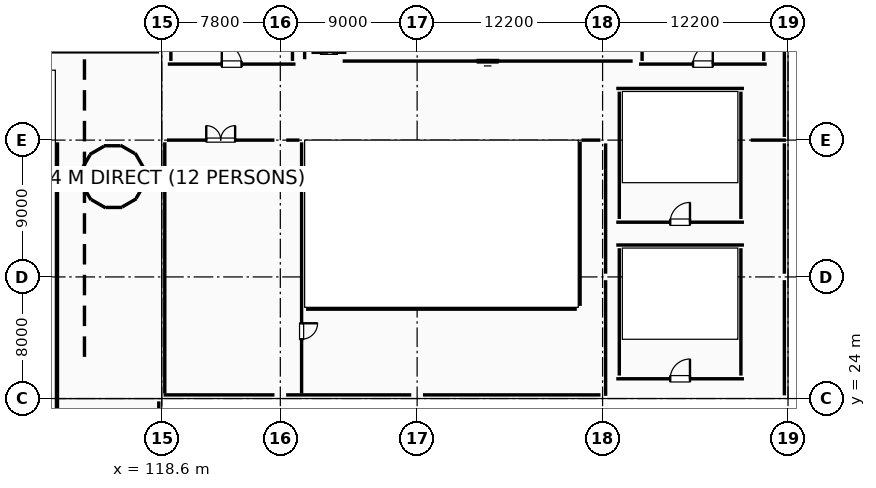
"""IFC4 building model, lengths in metres.
Left out: names, types, materials, properties, quantities, classifications, styles, units other than length and angle.
Written with IfcOpenShell. Run it as: python <this file> out.ifc"""

import sys

from ifc_helpers import new_model, si_unit, direction, frame, frame_2d, origin, origin_2d, place, context, subcontext, project, spatial, rectangle, i_section, extrude, element, fill, save


model = new_model("IFC4")
c1 = context("Model", 3, precision=1e-05, world=origin(), true_north=direction((0.0, 1.0)))
c2 = subcontext(c1, "Body", "Model", "MODEL_VIEW")
j1 = project(units=[si_unit("LENGTHUNIT", "METRE"), si_unit("PLANEANGLEUNIT", "RADIAN")], contexts=[c1])
p1 = place(None, origin())
s1 = spatial("IfcSite", under=j1, at=p1, CompositionType="ELEMENT")
p2 = place(p1, origin())
s2 = spatial("IfcBuilding", under=s1, at=p2, CompositionType="ELEMENT")
p3 = place(p2, frame((0.0, 0.0, 15.0)))
s3 = spatial("IfcBuildingStorey", under=s2, at=p3, CompositionType="ELEMENT", Elevation=15.0)
for number, where, z_axis, x_axis in (
    (1, (126.4, 24.0, 0.0), (0.0, 0.0, 1.0), (1.0, 0.0, 0.0)),
    (2, (126.4, 32.0, 0.0), (0.0, 0.0, 1.0), (1.0, 0.0, 0.0)),
):
    element("IfcColumn", number, at=place(p3, frame(where, z_axis=z_axis, x_axis=x_axis)), inside=s3, PredefinedType="COLUMN", context=c2, shape_type="SweptSolid", body=[
        extrude(rectangle(XDim=0.75, YDim=0.75, at=origin_2d()), origin(), (0.0, 0.0, 1.0), 4.76),
    ])
for number, where, z_axis, x_axis in (
    (3, (126.4, 41.0, 0.0), (0.0, 0.0, 1.0), (1.0, 0.0, 0.0)),
    (4, (135.4, 24.0, 0.0), (0.0, 0.0, 1.0), (1.0, 0.0, 0.0)),
    (5, (135.4, 41.0, 0.0), (0.0, 0.0, 1.0), (1.0, 0.0, 0.0)),
):
    element("IfcColumn", number, at=place(p3, frame(where, z_axis=z_axis, x_axis=x_axis)), inside=s3, PredefinedType="COLUMN", context=c2, shape_type="SweptSolid", body=[
        extrude(rectangle(XDim=0.75, YDim=0.75, at=origin_2d()), origin(), (0.0, 0.0, 1.0), 4.8),
    ])
for number, where, z_axis, x_axis in (
    (6, (147.6, 24.0, 0.0), (0.0, 0.0, 1.0), (1.0, 0.0, 0.0)),
    (7, (147.6, 32.0, 0.0), (0.0, 0.0, 1.0), (1.0, 0.0, 0.0)),
    (8, (147.6, 41.0, 0.0), (0.0, 0.0, 1.0), (1.0, 0.0, 0.0)),
):
    element("IfcColumn", number, at=place(p3, frame(where, z_axis=z_axis, x_axis=x_axis)), inside=s3, PredefinedType="COLUMN", context=c2, shape_type="SweptSolid", body=[
        extrude(i_section(OverallWidth=0.25, OverallDepth=0.4, WebThickness=0.01, FlangeThickness=0.013, FilletRadius=0.014, at=origin_2d()), origin(), (0.0, 0.0, 1.0), 4.8),
    ])
for number, where, z_axis, x_axis in (
    (9, (159.8, 24.0, 0.0), (0.0, 0.0, 1.0), (1.0, 0.0, 0.0)),
    (10, (159.8, 32.0, 0.0), (0.0, 0.0, 1.0), (1.0, 0.0, 0.0)),
    (11, (159.8, 41.0, 0.0), (0.0, 0.0, 1.0), (1.0, 0.0, 0.0)),
):
    element("IfcColumn", number, at=place(p3, frame(where, z_axis=z_axis, x_axis=x_axis)), inside=s3, PredefinedType="COLUMN", context=c2, shape_type="SweptSolid", body=[
        extrude(i_section(OverallWidth=0.25, OverallDepth=0.4, WebThickness=0.01, FlangeThickness=0.013, FilletRadius=0.014, at=origin_2d()), origin(), (0.0, 0.0, 1.0), 4.76),
    ])
p4 = place(p3, frame((112.6, 41.0, 0.0), z_axis=(0.0, 0.0, 1.0), x_axis=(1.0, 0.0, 0.0)))
e12 = element("IfcColumn", 12, at=p4, inside=s3, PredefinedType="COLUMN", context=c2, shape_type="SweptSolid", body=[
    extrude(rectangle(XDim=1.2, YDim=1.2, at=origin_2d()), origin(), (0.0, 0.0, 1.0), 4.8),
])
p5 = place(p3, frame((103.129, 46.805, 0.0), z_axis=(0.0, 0.0, 1.0), x_axis=(1.0, 0.0, 0.0)))
e13 = element("IfcWall", 13, at=p5, inside=s3, PredefinedType="STANDARD", context=c2, shape_type="SweptSolid", body=[
    extrude(rectangle(XDim=15.286, YDim=0.35, at=frame_2d((7.643, 0.0))), origin(), (0.0, 0.0, 1.0), 3.735),
])
for number, where, z_axis, x_axis in (
    (14, (159.56, 49.79, 0.0), (0.0, 0.0, 1.0), (0.0, -1.0, 0.0)),
    (15, (159.56, 40.79, 0.0), (0.0, 0.0, 1.0), (0.0, -1.0, 0.0)),
):
    element("IfcWall", number, at=place(p3, frame(where, z_axis=z_axis, x_axis=x_axis)), inside=s3, PredefinedType="PARAPET", context=c2, shape_type="SweptSolid", body=[
        extrude(rectangle(XDim=8.58, YDim=0.18, at=frame_2d((4.29, 0.0))), origin(), (0.0, 0.0, 1.0), 0.88),
    ])
p6 = place(p3, frame((159.56, 31.79, 0.0), z_axis=(0.0, 0.0, 1.0), x_axis=(0.0, -1.0, 0.0)))
e16 = element("IfcWall", 16, at=p6, inside=s3, PredefinedType="PARAPET", context=c2, shape_type="SweptSolid", body=[
    extrude(rectangle(XDim=7.58, YDim=0.18, at=frame_2d((3.79, 0.0))), origin(), (0.0, 0.0, 1.0), 0.88),
])
p7 = place(p3, frame((147.465, 24.24, 0.0), z_axis=(0.0, 0.0, 1.0), x_axis=(-1.0, 0.0, 0.0)))
e17 = element("IfcWall", 17, at=p7, inside=s3, PredefinedType="PARAPET", context=c2, shape_type="SweptSolid", body=[
    extrude(rectangle(XDim=11.68, YDim=0.18, at=frame_2d((5.84, 0.0))), origin(), (0.0, 0.0, 1.0), 0.88),
])
p8 = place(p3, frame((135.015, 24.24, 0.0), z_axis=(0.0, 0.0, 1.0), x_axis=(-1.0, 0.0, 0.0)))
e18 = element("IfcWall", 18, at=p8, inside=s3, PredefinedType="PARAPET", context=c2, shape_type="SweptSolid", body=[
    extrude(rectangle(XDim=8.23, YDim=0.18, at=frame_2d((4.115, 0.0))), origin(), (0.0, 0.0, 1.0), 0.88),
])
p9 = place(p3, frame((126.015, 24.24, 0.0), z_axis=(0.0, 0.0, 1.0), x_axis=(-1.0, 0.0, 0.0)))
e19 = element("IfcWall", 19, at=p9, inside=s3, PredefinedType="PARAPET", context=c2, shape_type="SweptSolid", body=[
    extrude(rectangle(XDim=7.295, YDim=0.18, at=frame_2d((3.647, 0.0))), origin(), (0.0, 0.0, 1.0), 0.88),
])
p10 = place(p3, frame((118.405, 23.815, 0.0), z_axis=(0.0, 0.0, 1.0), x_axis=(0.0, -1.0, 0.0)))
e20 = element("IfcWall", 20, at=p10, inside=s3, PredefinedType="STANDARD", context=c2, shape_type="SweptSolid", body=[
    extrude(rectangle(XDim=13.63, YDim=0.35, at=frame_2d((6.815, 0.0))), origin(), (0.0, 0.0, 1.0), 3.735),
])
p11 = place(p3, frame((119.0, 46.0, 0.0), z_axis=(0.0, 0.0, 1.0), x_axis=(1.0, 0.0, 0.0)))
e21 = element("IfcWall", 21, at=p11, inside=s3, PredefinedType="SHEAR", context=c2, shape_type="SweptSolid", body=[
    extrude(rectangle(XDim=8.4, YDim=0.4, at=frame_2d((4.2, 0.0))), origin(), (0.0, 0.0, 1.0), 4.55),
])
p12 = place(p11, frame((3.55, 0.0, 0.0)))
e22 = element("IfcOpeningElement", 22, at=p12, cuts=e21, PredefinedType="OPENING", context=c2, shape_type="SweptSolid", body=[
    extrude(rectangle(XDim=1.3, YDim=2.15, at=frame_2d((0.65, 1.075))), frame((0.0, 0.21, 0.0), z_axis=(0.0, -1.0, 0.0), x_axis=(1.0, 0.0, 0.0)), (0.0, 0.0, 1.0), 0.42),
])
for number, where, z_axis, x_axis in (
    (23, (127.2, 46.21, 0.0), (0.0, 0.0, 1.0), (0.0, 1.0, 0.0)),
    (24, (119.2, 54.59, 0.0), (0.0, 0.0, 1.0), (0.0, -1.0, 0.0)),
):
    element("IfcWall", number, at=place(p3, frame(where, z_axis=z_axis, x_axis=x_axis)), inside=s3, PredefinedType="SHEAR", context=c2, shape_type="SweptSolid", body=[
        extrude(rectangle(XDim=8.38, YDim=0.4, at=frame_2d((4.19, 0.0))), origin(), (0.0, 0.0, 1.0), 4.55),
    ])
p13 = place(p3, frame((128.45, 46.775, 0.0), z_axis=(0.0, 0.0, 1.0), x_axis=(1.0, 0.0, 0.0)))
e25 = element("IfcWall", 25, at=p13, inside=s3, PredefinedType="STANDARD", context=c2, shape_type="SweptSolid", body=[
    extrude(rectangle(XDim=2.3, YDim=0.25, at=frame_2d((1.15, 0.0))), origin(), (0.0, 0.0, 1.0), 4.53),
])
p14 = place(p13, frame((0.6, 0.0, 0.0)))
e26 = element("IfcOpeningElement", 26, at=p14, cuts=e25, PredefinedType="OPENING", context=c2, shape_type="SweptSolid", body=[
    extrude(rectangle(XDim=1.1, YDim=2.15, at=frame_2d((0.55, 1.075))), frame((0.0, 0.135, 0.0), z_axis=(0.0, -1.0, 0.0), x_axis=(1.0, 0.0, 0.0)), (0.0, 0.0, 1.0), 0.27),
])
p15 = place(p3, frame((150.0, 46.0, 0.0), z_axis=(0.0, 0.0, 1.0), x_axis=(1.0, 0.0, 0.0)))
e27 = element("IfcWall", 27, at=p15, inside=s3, PredefinedType="SHEAR", context=c2, shape_type="SweptSolid", body=[
    extrude(rectangle(XDim=8.4, YDim=0.4, at=frame_2d((4.2, 0.0))), origin(), (0.0, 0.0, 1.0), 4.58),
])
p16 = place(p15, frame((3.55, 0.0, 0.0)))
e28 = element("IfcOpeningElement", 28, at=p16, cuts=e27, PredefinedType="OPENING", context=c2, shape_type="SweptSolid", body=[
    extrude(rectangle(XDim=1.3, YDim=2.15, at=frame_2d((0.65, 1.075))), frame((0.0, 0.21, 0.0), z_axis=(0.0, -1.0, 0.0), x_axis=(1.0, 0.0, 0.0)), (0.0, 0.0, 1.0), 0.42),
])
for number, where, z_axis, x_axis in (
    (29, (158.2, 46.21, 0.0), (0.0, 0.0, 1.0), (0.0, 1.0, 0.0)),
    (30, (150.2, 54.59, 0.0), (0.0, 0.0, 1.0), (0.0, -1.0, 0.0)),
):
    element("IfcWall", number, at=place(p3, frame(where, z_axis=z_axis, x_axis=x_axis)), inside=s3, PredefinedType="SHEAR", context=c2, shape_type="SweptSolid", body=[
        extrude(rectangle(XDim=8.38, YDim=0.4, at=frame_2d((4.19, 0.0))), origin(), (0.0, 0.0, 1.0), 4.58),
    ])
p17 = place(p3, frame((148.5, 25.3, 0.0), z_axis=(0.0, 0.0, 1.0), x_axis=(1.0, 0.0, 0.0)))
e31 = element("IfcWall", 31, at=p17, inside=s3, PredefinedType="SHEAR", context=c2, shape_type="SweptSolid", body=[
    extrude(rectangle(XDim=8.4, YDim=0.4, at=frame_2d((4.2, 0.0))), origin(), (0.0, 0.0, 1.0), 4.58),
])
p18 = place(p17, frame((3.55, 0.0, 0.0)))
e32 = element("IfcOpeningElement", 32, at=p18, cuts=e31, PredefinedType="OPENING", context=c2, shape_type="SweptSolid", body=[
    extrude(rectangle(XDim=1.3, YDim=2.15, at=frame_2d((0.65, 1.075))), frame((0.0, 0.21, 0.0), z_axis=(0.0, -1.0, 0.0), x_axis=(1.0, 0.0, 0.0)), (0.0, 0.0, 1.0), 0.42),
])
p19 = place(p3, frame((156.9, 34.1, 0.0), z_axis=(0.0, 0.0, 1.0), x_axis=(-1.0, 0.0, 0.0)))
e33 = element("IfcWall", 33, at=p19, inside=s3, PredefinedType="SHEAR", context=c2, shape_type="SweptSolid", body=[
    extrude(rectangle(XDim=8.4, YDim=0.4, at=frame_2d((4.2, 0.0))), origin(), (0.0, 0.0, 1.0), 4.58),
])
for number, where, z_axis, x_axis in (
    (34, (156.7, 25.51, 0.0), (0.0, 0.0, 1.0), (0.0, 1.0, 0.0)),
    (35, (148.7, 33.89, 0.0), (0.0, 0.0, 1.0), (0.0, -1.0, 0.0)),
):
    element("IfcWall", number, at=place(p3, frame(where, z_axis=z_axis, x_axis=x_axis)), inside=s3, PredefinedType="SHEAR", context=c2, shape_type="SweptSolid", body=[
        extrude(rectangle(XDim=8.38, YDim=0.4, at=frame_2d((4.19, 0.0))), origin(), (0.0, 0.0, 1.0), 4.58),
    ])
p20 = place(p3, frame((148.5, 35.6, 0.0), z_axis=(0.0, 0.0, 1.0), x_axis=(1.0, 0.0, 0.0)))
e36 = element("IfcWall", 36, at=p20, inside=s3, PredefinedType="SHEAR", context=c2, shape_type="SweptSolid", body=[
    extrude(rectangle(XDim=8.4, YDim=0.4, at=frame_2d((4.2, 0.0))), origin(), (0.0, 0.0, 1.0), 4.58),
])
p21 = place(p20, frame((3.55, 0.0, 0.0)))
e37 = element("IfcOpeningElement", 37, at=p21, cuts=e36, PredefinedType="OPENING", context=c2, shape_type="SweptSolid", body=[
    extrude(rectangle(XDim=1.3, YDim=2.15, at=frame_2d((0.65, 1.075))), frame((0.0, 0.21, 0.0), z_axis=(0.0, -1.0, 0.0), x_axis=(1.0, 0.0, 0.0)), (0.0, 0.0, 1.0), 0.42),
])
p22 = place(p3, frame((156.9, 44.4, 0.0), z_axis=(0.0, 0.0, 1.0), x_axis=(-1.0, 0.0, 0.0)))
e38 = element("IfcWall", 38, at=p22, inside=s3, PredefinedType="SHEAR", context=c2, shape_type="SweptSolid", body=[
    extrude(rectangle(XDim=8.4, YDim=0.4, at=frame_2d((4.2, 0.0))), origin(), (0.0, 0.0, 1.0), 4.58),
])
for number, where, z_axis, x_axis in (
    (39, (156.7, 35.81, 0.0), (0.0, 0.0, 1.0), (0.0, 1.0, 0.0)),
    (40, (148.7, 44.19, 0.0), (0.0, 0.0, 1.0), (0.0, -1.0, 0.0)),
):
    element("IfcWall", number, at=place(p3, frame(where, z_axis=z_axis, x_axis=x_axis)), inside=s3, PredefinedType="SHEAR", context=c2, shape_type="SweptSolid", body=[
        extrude(rectangle(XDim=8.38, YDim=0.4, at=frame_2d((4.19, 0.0))), origin(), (0.0, 0.0, 1.0), 4.58),
    ])
p23 = place(p3, frame((117.461, 39.086, 0.0), z_axis=(0.0, 0.0, 1.0), x_axis=(-0.500080723117, 0.865978793255, 0.0)))
e41 = element("IfcWall", 41, at=p23, inside=s3, PredefinedType="SHEAR", context=c2, shape_type="SweptSolid", body=[
    extrude(rectangle(XDim=1.219, YDim=0.35, at=frame_2d((0.609, 0.0))), origin(), (0.0, 0.0, 1.0), 4.55),
])
for number, where, z_axis, x_axis in (
    (42, (116.833, 40.115, 0.0), (0.0, 0.0, 1.0), (-0.866, 0.5, 0.0)),
    (43, (115.884, 40.628, 0.0), (0.0, 0.0, 1.0), (-1.0, 0.0, 0.0)),
    (44, (114.804, 40.598, 0.0), (0.0, 0.0, 1.0), (-0.866, -0.5, 0.0)),
    (45, (113.885, 40.033, 0.0), (0.0, 0.0, 1.0), (-0.5, -0.866, 0.0)),
    (46, (113.372, 39.083, 0.0), (0.0, 0.0, 1.0), (0.0, -1.0, 0.0)),
    (47, (113.402, 38.004, 0.0), (0.0, 0.0, 1.0), (0.5, -0.866, 0.0)),
    (48, (113.967, 37.085, 0.0), (0.0, 0.0, 1.0), (0.866, -0.5, 0.0)),
    (49, (114.917, 36.572, 0.0), (0.0, 0.0, 1.0), (1.0, 0.0, 0.0)),
    (50, (115.996, 36.602, 0.0), (0.0, 0.0, 1.0), (0.866, 0.5, 0.0)),
    (51, (116.915, 37.167, 0.0), (0.0, 0.0, 1.0), (0.5, 0.866, 0.0)),
):
    element("IfcWall", number, at=place(p3, frame(where, z_axis=z_axis, x_axis=x_axis)), inside=s3, PredefinedType="SHEAR", context=c2, shape_type="SweptSolid", body=[
        extrude(rectangle(XDim=1.093, YDim=0.35, at=frame_2d((0.546, 0.0))), origin(), (0.0, 0.0, 1.0), 4.55),
    ])
p24 = place(p3, frame((117.428, 38.116, 0.0), z_axis=(0.0, 0.0, 1.0), x_axis=(0.0, 1.0, 0.0)))
e52 = element("IfcWall", 52, at=p24, inside=s3, PredefinedType="SHEAR", context=c2, shape_type="SweptSolid", body=[
    extrude(rectangle(XDim=0.967, YDim=0.35, at=frame_2d((0.483, 0.0))), origin(), (0.0, 0.0, 1.0), 4.55),
])
p25 = place(p3, frame((111.74, 21.345, 0.0), z_axis=(0.0, 0.0, 1.0), x_axis=(0.0, 1.0, 0.0)))
e53 = element("IfcWall", 53, at=p25, inside=s3, PredefinedType="PARTITIONING", context=c2, shape_type="SweptSolid", body=[
    extrude(rectangle(XDim=19.51, YDim=0.25, at=frame_2d((9.755, 0.0))), origin(), (0.0, 0.0, 1.0), 4.54),
])
p26 = place(p3, frame((149.58, 46.2, 0.0), z_axis=(0.0, 0.0, 1.0), x_axis=(-1.0, 0.0, 0.0)))
e54 = element("IfcWall", 54, at=p26, inside=s3, PredefinedType="PARTITIONING", context=c2, shape_type="SweptSolid", body=[
    extrude(rectangle(XDim=19.08, YDim=0.2, at=frame_2d((9.54, 0.0))), origin(), (0.0, 0.0, 1.0), 4.53),
])
p27 = place(p26, frame((8.84, 0.0, 0.0)))
e55 = element("IfcOpeningElement", 55, at=p27, cuts=e54, PredefinedType="OPENING", context=c2, shape_type="SweptSolid", body=[
    extrude(rectangle(XDim=1.4, YDim=2.15, at=frame_2d((0.7, 1.075))), frame((0.0, 0.11, 0.0), z_axis=(0.0, -1.0, 0.0), x_axis=(1.0, 0.0, 0.0)), (0.0, 0.0, 1.0), 0.22),
])
p28 = place(p3, frame((128.0, 46.32, 0.0), z_axis=(0.0, 0.0, 1.0), x_axis=(0.0, 1.0, 0.0)))
e56 = element("IfcWall", 56, at=p28, inside=s3, PredefinedType="PARTITIONING", context=c2, shape_type="SweptSolid", body=[
    extrude(rectangle(XDim=9.376, YDim=0.2, at=frame_2d((4.688, 0.0))), origin(), (0.0, 0.0, 1.0), 4.54),
])
p29 = place(p3, frame((147.8, 24.18, 0.0), z_axis=(0.0, 0.0, 1.0), x_axis=(0.0, 1.0, 0.0)))
e57 = element("IfcWall", 57, at=p29, inside=s3, PredefinedType="PARTITIONING", context=c2, shape_type="SweptSolid", body=[
    extrude(rectangle(XDim=7.605, YDim=0.25, at=frame_2d((3.802, 0.0))), origin(), (0.0, 0.0, 1.0), 4.57),
])
p30 = place(p3, frame((147.8, 32.215, 0.0), z_axis=(0.0, 0.0, 1.0), x_axis=(0.0, 1.0, 0.0)))
e58 = element("IfcWall", 58, at=p30, inside=s3, PredefinedType="PARTITIONING", context=c2, shape_type="SweptSolid", body=[
    extrude(rectangle(XDim=8.57, YDim=0.25, at=frame_2d((4.285, 0.0))), origin(), (0.0, 0.0, 1.0), 4.57),
])
p31 = place(p3, frame((157.345, 41.0, 0.0), z_axis=(0.0, 0.0, 1.0), x_axis=(1.0, 0.0, 0.0)))
e59 = element("IfcWall", 59, at=p31, inside=s3, PredefinedType="PARTITIONING", context=c2, shape_type="SweptSolid", body=[
    extrude(rectangle(XDim=2.326, YDim=0.25, at=frame_2d((1.163, 0.0))), origin(), (0.0, 0.0, 1.0), 3.98),
])
p32 = place(p3, frame((118.945, 41.0, 0.0), z_axis=(0.0, 0.0, 1.0), x_axis=(1.0, 0.0, 0.0)))
e60 = element("IfcWall", 60, at=p32, inside=s3, PredefinedType="PARTITIONING", context=c2, shape_type="SweptSolid", body=[
    extrude(rectangle(XDim=7.065, YDim=0.25, at=frame_2d((3.532, 0.0))), origin(), (0.0, 0.0, 1.0), 3.87),
])
p33 = place(p32, frame((2.583, 0.0, 0.0)))
e61 = element("IfcOpeningElement", 61, at=p33, cuts=e60, PredefinedType="OPENING", context=c2, shape_type="SweptSolid", body=[
    extrude(rectangle(XDim=1.9, YDim=2.35, at=frame_2d((0.95, 1.175))), frame((0.0, 0.135, 0.0), z_axis=(0.0, -1.0, 0.0), x_axis=(1.0, 0.0, 0.0)), (0.0, 0.0, 1.0), 0.27),
])
p34 = place(p3, frame((126.79, 41.0, 0.0), z_axis=(0.0, 0.0, 1.0), x_axis=(1.0, 0.0, 0.0)))
e62 = element("IfcWall", 62, at=p34, inside=s3, PredefinedType="PARTITIONING", context=c2, shape_type="SweptSolid", body=[
    extrude(rectangle(XDim=0.865, YDim=0.25, at=frame_2d((0.433, 0.0))), origin(), (0.0, 0.0, 1.0), 4.07),
])
p35 = place(p3, frame((127.8, 40.855, 0.0), z_axis=(0.0, 0.0, 1.0), x_axis=(0.0, -1.0, 0.0)))
e63 = element("IfcWall", 63, at=p35, inside=s3, PredefinedType="PARTITIONING", context=c2, shape_type="SweptSolid", body=[
    extrude(rectangle(XDim=16.521, YDim=0.25, at=frame_2d((8.26, 0.0))), origin(), (0.0, 0.0, 1.0), 4.53),
])
p36 = place(p35, frame((11.903, 0.0, 0.0)))
e64 = element("IfcOpeningElement", 64, at=p36, cuts=e63, PredefinedType="OPENING", context=c2, shape_type="SweptSolid", body=[
    extrude(rectangle(XDim=1.05, YDim=2.15, at=frame_2d((0.525, 1.075))), frame((0.0, 0.135, 0.0), z_axis=(0.0, -1.0, 0.0), x_axis=(1.0, 0.0, 0.0)), (0.0, 0.0, 1.0), 0.27),
])
p37 = place(p3, frame((118.8, 24.334, 0.0), z_axis=(0.0, 0.0, 1.0), x_axis=(0.0, 1.0, 0.0)))
e65 = element("IfcWall", 65, at=p37, inside=s3, PredefinedType="PARTITIONING", context=c2, shape_type="SweptSolid", body=[
    extrude(rectangle(XDim=16.521, YDim=0.25, at=frame_2d((8.26, 0.0))), origin(), (0.0, 0.0, 1.0), 3.73),
])
p38 = place(p3, frame((128.095, 29.88, 0.0), z_axis=(0.0, 0.0, 1.0), x_axis=(1.0, 0.0, 0.0)))
e66 = element("IfcWall", 66, at=p38, inside=s3, PredefinedType="PARTITIONING", context=c2, shape_type="SweptSolid", body=[
    extrude(rectangle(XDim=17.81, YDim=0.15, at=frame_2d((8.905, 0.0))), origin(), (0.0, 0.0, 1.0), 4.53),
])
p39 = place(p3, frame((146.12, 30.095, 0.0), z_axis=(0.0, 0.0, 1.0), x_axis=(0.0, 1.0, 0.0)))
e67 = element("IfcWall", 67, at=p39, inside=s3, PredefinedType="PARTITIONING", context=c2, shape_type="SweptSolid", body=[
    extrude(rectangle(XDim=10.81, YDim=0.15, at=frame_2d((5.405, 0.0))), origin(), (0.0, 0.0, 1.0), 4.8),
])
p40 = place(p3, frame((146.215, 41.0, 0.0), z_axis=(0.0, 0.0, 1.0), x_axis=(1.0, 0.0, 0.0)))
e68 = element("IfcWall", 68, at=p40, inside=s3, PredefinedType="PARTITIONING", context=c2, shape_type="SweptSolid", body=[
    extrude(rectangle(XDim=1.245, YDim=0.15, at=frame_2d((0.623, 0.0))), origin(), (0.0, 0.0, 1.0), 3.92),
])
p41 = place(p12, origin())
e69 = element("IfcDoor", 69, at=p41, inside=s3, OperationType="SINGLE_SWING_LEFT", PredefinedType="DOOR", context=c2, shape_type="SweptSolid", body=[
    extrude(rectangle(XDim=1.3, YDim=2.15, at=frame_2d((0.65, 1.075))), frame((0.0, 0.025, 0.0), z_axis=(0.0, -1.0, 0.0), x_axis=(1.0, 0.0, 0.0)), (0.0, 0.0, 1.0), 0.05),
])
fill(e22, e69)
p42 = place(p14, origin())
e70 = element("IfcDoor", 70, at=p42, inside=s3, OperationType="DOUBLE_DOOR_SLIDING", PredefinedType="DOOR", context=c2, shape_type="SweptSolid", body=[
    extrude(rectangle(XDim=1.1, YDim=2.15, at=frame_2d((0.55, 1.075))), frame((0.0, 0.025, 0.0), z_axis=(0.0, -1.0, 0.0), x_axis=(1.0, 0.0, 0.0)), (0.0, 0.0, 1.0), 0.05),
])
fill(e26, e70)
p43 = place(p16, origin())
e71 = element("IfcDoor", 71, at=p43, inside=s3, OperationType="SINGLE_SWING_RIGHT", PredefinedType="DOOR", context=c2, shape_type="SweptSolid", body=[
    extrude(rectangle(XDim=1.3, YDim=2.15, at=frame_2d((0.65, 1.075))), frame((0.0, 0.025, 0.0), z_axis=(0.0, -1.0, 0.0), x_axis=(1.0, 0.0, 0.0)), (0.0, 0.0, 1.0), 0.05),
])
fill(e28, e71)
p44 = place(p18, origin())
e72 = element("IfcDoor", 72, at=p44, inside=s3, OperationType="SINGLE_SWING_RIGHT", PredefinedType="DOOR", context=c2, shape_type="SweptSolid", body=[
    extrude(rectangle(XDim=1.3, YDim=2.15, at=frame_2d((0.65, 1.075))), frame((0.0, 0.025, 0.0), z_axis=(0.0, -1.0, 0.0), x_axis=(1.0, 0.0, 0.0)), (0.0, 0.0, 1.0), 0.05),
])
fill(e32, e72)
p45 = place(p21, origin())
e73 = element("IfcDoor", 73, at=p45, inside=s3, OperationType="SINGLE_SWING_RIGHT", PredefinedType="DOOR", context=c2, shape_type="SweptSolid", body=[
    extrude(rectangle(XDim=1.3, YDim=2.15, at=frame_2d((0.65, 1.075))), frame((0.0, 0.025, 0.0), z_axis=(0.0, -1.0, 0.0), x_axis=(1.0, 0.0, 0.0)), (0.0, 0.0, 1.0), 0.05),
])
fill(e37, e73)
p46 = place(p27, origin())
e74 = element("IfcDoor", 74, at=p46, inside=s3, OperationType="SLIDING_TO_LEFT", PredefinedType="DOOR", context=c2, shape_type="SweptSolid", body=[
    extrude(rectangle(XDim=1.4, YDim=2.15, at=frame_2d((0.7, 1.075))), frame((0.0, 0.025, 0.0), z_axis=(0.0, -1.0, 0.0), x_axis=(1.0, 0.0, 0.0)), (0.0, 0.0, 1.0), 0.05),
])
fill(e55, e74)
p47 = place(p33, origin())
e75 = element("IfcDoor", 75, at=p47, inside=s3, OperationType="DOUBLE_SWING_RIGHT", PredefinedType="DOOR", context=c2, shape_type="SweptSolid", body=[
    extrude(rectangle(XDim=1.9, YDim=2.35, at=frame_2d((0.95, 1.175))), frame((0.0, 0.025, 0.0), z_axis=(0.0, -1.0, 0.0), x_axis=(1.0, 0.0, 0.0)), (0.0, 0.0, 1.0), 0.05),
])
fill(e61, e75)
p48 = place(p36, origin())
e76 = element("IfcDoor", 76, at=p48, inside=s3, OperationType="SINGLE_SWING_LEFT", PredefinedType="DOOR", context=c2, shape_type="SweptSolid", body=[
    extrude(rectangle(XDim=1.05, YDim=2.15, at=frame_2d((0.525, 1.075))), frame((0.0, 0.025, 0.0), z_axis=(0.0, -1.0, 0.0), x_axis=(1.0, 0.0, 0.0)), (0.0, 0.0, 1.0), 0.05),
])
fill(e64, e76)
save(model, sys.argv[1])
